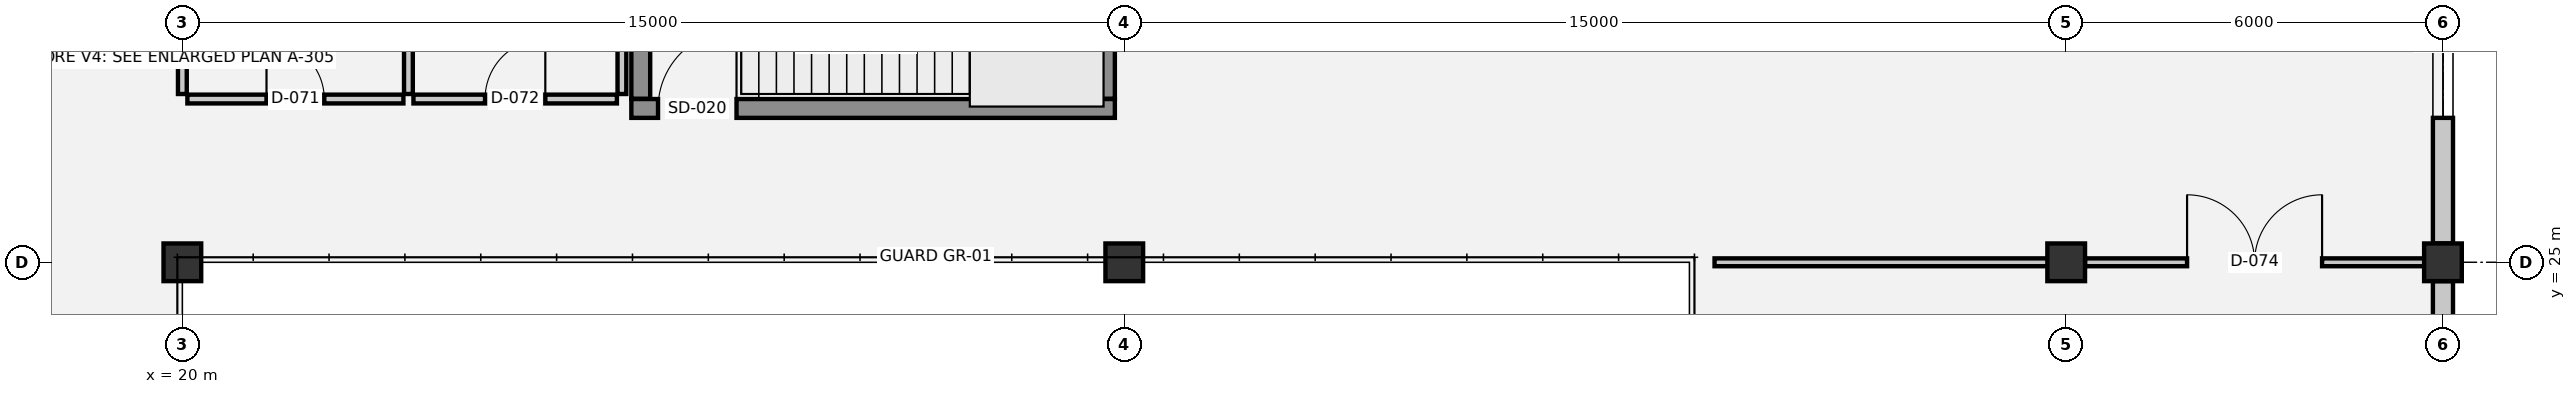
"""IFC4 building model, lengths in metres.
Left out: names, types, materials, properties, quantities, classifications, styles, units other than length and angle.
Written with IfcOpenShell. Run it as: python <this file> out.ifc"""

import sys

from ifc_helpers import new_model, si_unit, direction, frame, frame_2d, origin, origin_2d, place, context, subcontext, project, spatial, rectangle, extrude, element, fill, save


model = new_model("IFC4")
c1 = context("Model", 3, precision=1e-05, world=origin(), true_north=direction((0.0, 1.0)))
c2 = subcontext(c1, "Body", "Model", "MODEL_VIEW")
j1 = project(units=[si_unit("LENGTHUNIT", "METRE"), si_unit("PLANEANGLEUNIT", "RADIAN")], contexts=[c1])
p1 = place(None, origin())
s1 = spatial("IfcSite", under=j1, at=p1, CompositionType="ELEMENT")
p2 = place(p1, origin())
s2 = spatial("IfcBuilding", under=s1, at=p2, CompositionType="ELEMENT")
p3 = place(p2, frame((0.0, 0.0, 9.9)))
s3 = spatial("IfcBuildingStorey", under=s2, at=p3, CompositionType="ELEMENT", Elevation=9.9)
for number, where, z_axis, x_axis in (
    (1, (20.0, 25.0, 0.0), (0.0, 0.0, 1.0), (1.0, 0.0, 0.0)),
    (2, (35.0, 25.0, 0.0), (0.0, 0.0, 1.0), (1.0, 0.0, 0.0)),
    (3, (50.0, 25.0, 0.0), (0.0, 0.0, 1.0), (1.0, 0.0, 0.0)),
    (4, (56.0, 25.0, 0.0), (0.0, 0.0, 1.0), (1.0, 0.0, 0.0)),
):
    element("IfcColumn", number, at=place(p3, frame(where, z_axis=z_axis, x_axis=x_axis)), inside=s3, PredefinedType="COLUMN", context=c2, shape_type="SweptSolid", body=[
        extrude(rectangle(XDim=0.6, YDim=0.6, at=origin_2d()), origin(), (0.0, 0.0, 1.0), 4.5),
    ])
p4 = place(p3, frame((56.0, 31.7, 0.0), z_axis=(0.0, 0.0, 1.0), x_axis=(0.0, -1.0, 0.0)))
e5 = element("IfcWall", 5, at=p4, inside=s3, PredefinedType="SOLIDWALL", context=c2, shape_type="SweptSolid", body=[
    extrude(rectangle(XDim=6.4, YDim=0.32, at=frame_2d((3.2, 0.0))), origin(), (0.0, 0.0, 1.0), 3.26),
])
p5 = place(p4, frame((2.0, 0.0, 0.9)))
e6 = element("IfcOpeningElement", 6, at=p5, cuts=e5, PredefinedType="OPENING", context=c2, shape_type="SweptSolid", body=[
    extrude(rectangle(XDim=2.4, YDim=2.1, at=frame_2d((1.2, 1.05))), frame((0.0, 0.17, 0.0), z_axis=(0.0, -1.0, 0.0), x_axis=(1.0, 0.0, 0.0)), (0.0, 0.0, 1.0), 0.34),
])
p6 = place(p3, frame((56.0, 24.7, 0.0), z_axis=(0.0, 0.0, 1.0), x_axis=(0.0, -1.0, 0.0)))
e7 = element("IfcWall", 7, at=p6, inside=s3, PredefinedType="SOLIDWALL", context=c2, shape_type="SweptSolid", body=[
    extrude(rectangle(XDim=7.4, YDim=0.32, at=frame_2d((3.7, 0.0))), origin(), (0.0, 0.0, 1.0), 3.26),
])
p7 = place(p6, frame((2.5, 0.0, 0.9)))
e8 = element("IfcOpeningElement", 8, at=p7, cuts=e7, PredefinedType="OPENING", context=c2, shape_type="SweptSolid", body=[
    extrude(rectangle(XDim=2.4, YDim=2.1, at=frame_2d((1.2, 1.05))), frame((0.0, 0.17, 0.0), z_axis=(0.0, -1.0, 0.0), x_axis=(1.0, 0.0, 0.0)), (0.0, 0.0, 1.0), 0.34),
])
p8 = place(p3, frame((15.05, 28.325, 0.0), z_axis=(0.0, 0.0, 1.0), x_axis=(1.0, 0.0, 0.0)))
e9 = element("IfcWall", 9, at=p8, inside=s3, PredefinedType="SHEAR", context=c2, shape_type="SweptSolid", body=[
    extrude(rectangle(XDim=2.9, YDim=0.25, at=frame_2d((1.45, 0.0))), origin(), (0.0, 0.0, 1.0), 4.5),
])
p9 = place(p8, frame((0.9, 0.0, 0.0)))
e10 = element("IfcOpeningElement", 10, at=p9, cuts=e9, PredefinedType="OPENING", context=c2, shape_type="SweptSolid", body=[
    extrude(rectangle(XDim=1.1, YDim=2.15, at=frame_2d((0.55, 1.075))), frame((0.0, 0.135, 0.0), z_axis=(0.0, -1.0, 0.0), x_axis=(1.0, 0.0, 0.0)), (0.0, 0.0, 1.0), 0.27),
])
p10 = place(p3, frame((27.15, 27.45, 0.0), z_axis=(0.0, 0.0, 1.0), x_axis=(1.0, 0.0, 0.0)))
e11 = element("IfcWall", 11, at=p10, inside=s3, PredefinedType="SHEAR", context=c2, shape_type="SweptSolid", body=[
    extrude(rectangle(XDim=7.7, YDim=0.3, at=frame_2d((3.85, 0.0))), origin(), (0.0, 0.0, 1.0), 4.24),
])
p11 = place(p10, frame((0.425, 0.0, 0.0)))
e12 = element("IfcOpeningElement", 12, at=p11, cuts=e11, PredefinedType="OPENING", context=c2, shape_type="SweptSolid", body=[
    extrude(rectangle(XDim=1.25, YDim=2.15, at=frame_2d((0.625, 1.075))), frame((0.0, 0.16, 0.0), z_axis=(0.0, -1.0, 0.0), x_axis=(1.0, 0.0, 0.0)), (0.0, 0.0, 1.0), 0.32),
])
for number, where, z_axis, x_axis in (
    (13, (27.3, 31.805, 0.0), (0.0, 0.0, 1.0), (0.0, -1.0, 0.0)),
    (14, (34.7, 27.605, 0.0), (0.0, 0.0, 1.0), (0.0, 1.0, 0.0)),
):
    element("IfcWall", number, at=place(p3, frame(where, z_axis=z_axis, x_axis=x_axis)), inside=s3, PredefinedType="SHEAR", context=c2, shape_type="SweptSolid", body=[
        extrude(rectangle(XDim=4.2, YDim=0.3, at=frame_2d((2.1, 0.0))), origin(), (0.0, 0.0, 1.0), 4.24),
    ])
p12 = place(p3, frame((44.4, 25.0, 0.0), z_axis=(0.0, 0.0, 1.0), x_axis=(1.0, 0.0, 0.0)))
e15 = element("IfcWall", 15, at=p12, inside=s3, PredefinedType="PARTITIONING", context=c2, shape_type="SweptSolid", body=[
    extrude(rectangle(XDim=5.9, YDim=0.125, at=frame_2d((2.95, 0.0))), origin(), (0.0, 0.0, 1.0), 3.28),
])
p13 = place(p3, frame((50.3, 25.0, 0.0), z_axis=(0.0, 0.0, 1.0), x_axis=(1.0, 0.0, 0.0)))
e16 = element("IfcWall", 16, at=p13, inside=s3, PredefinedType="PARTITIONING", context=c2, shape_type="SweptSolid", body=[
    extrude(rectangle(XDim=5.62, YDim=0.125, at=frame_2d((2.81, 0.0))), origin(), (0.0, 0.0, 1.0), 3.53),
])
p14 = place(p13, frame((1.625, 0.0, 0.0)))
e17 = element("IfcOpeningElement", 17, at=p14, cuts=e16, PredefinedType="OPENING", context=c2, shape_type="SweptSolid", body=[
    extrude(rectangle(XDim=2.15, YDim=2.4, at=frame_2d((1.075, 1.2))), frame((0.0, 0.073, 0.0), z_axis=(0.0, -1.0, 0.0), x_axis=(1.0, 0.0, 0.0)), (0.0, 0.0, 1.0), 0.145),
])
p15 = place(p3, frame((20.08, 27.6, 0.0), z_axis=(0.0, 0.0, 1.0), x_axis=(1.0, 0.0, 0.0)))
e18 = element("IfcWall", 18, at=p15, inside=s3, PredefinedType="PLUMBINGWALL", context=c2, shape_type="SweptSolid", body=[
    extrude(rectangle(XDim=3.44, YDim=0.14, at=frame_2d((1.72, 0.0))), origin(), (0.0, 0.0, 1.0), 4.14),
])
p16 = place(p15, frame((1.26, 0.0, 0.0)))
e19 = element("IfcOpeningElement", 19, at=p16, cuts=e18, PredefinedType="OPENING", context=c2, shape_type="SweptSolid", body=[
    extrude(rectangle(XDim=0.92, YDim=2.1, at=frame_2d((0.46, 1.05))), frame((0.0, 0.08, 0.0), z_axis=(0.0, -1.0, 0.0), x_axis=(1.0, 0.0, 0.0)), (0.0, 0.0, 1.0), 0.16),
])
p17 = place(p3, frame((23.68, 27.6, 0.0), z_axis=(0.0, 0.0, 1.0), x_axis=(1.0, 0.0, 0.0)))
e20 = element("IfcWall", 20, at=p17, inside=s3, PredefinedType="PLUMBINGWALL", context=c2, shape_type="SweptSolid", body=[
    extrude(rectangle(XDim=3.24, YDim=0.14, at=frame_2d((1.62, 0.0))), origin(), (0.0, 0.0, 1.0), 4.14),
])
p18 = place(p17, frame((1.14, 0.0, 0.0)))
e21 = element("IfcOpeningElement", 21, at=p18, cuts=e20, PredefinedType="OPENING", context=c2, shape_type="SweptSolid", body=[
    extrude(rectangle(XDim=0.96, YDim=2.1, at=frame_2d((0.48, 1.05))), frame((0.0, 0.08, 0.0), z_axis=(0.0, -1.0, 0.0), x_axis=(1.0, 0.0, 0.0)), (0.0, 0.0, 1.0), 0.16),
])
p19 = place(p3, frame((20.0, 27.68, 0.0), z_axis=(0.0, 0.0, 1.0), x_axis=(0.0, 1.0, 0.0)))
e22 = element("IfcWall", 22, at=p19, inside=s3, PredefinedType="PLUMBINGWALL", context=c2, shape_type="SweptSolid", body=[
    extrude(rectangle(XDim=4.24, YDim=0.14, at=frame_2d((2.12, 0.0))), origin(), (0.0, 0.0, 1.0), 3.68),
])
for number, where, z_axis, x_axis in (
    (23, (23.6, 27.68, 0.0), (0.0, 0.0, 1.0), (0.0, 1.0, 0.0)),
    (24, (27.0, 27.68, 0.0), (0.0, 0.0, 1.0), (0.0, 1.0, 0.0)),
):
    element("IfcWall", number, at=place(p3, frame(where, z_axis=z_axis, x_axis=x_axis)), inside=s3, PredefinedType="PLUMBINGWALL", context=c2, shape_type="SweptSolid", body=[
        extrude(rectangle(XDim=4.24, YDim=0.14, at=frame_2d((2.12, 0.0))), origin(), (0.0, 0.0, 1.0), 4.14),
    ])
p20 = place(p5, origin())
e25 = element("IfcWindow", 25, at=p20, inside=s3, PartitioningType="SINGLE_PANEL", PredefinedType="WINDOW", context=c2, shape_type="SweptSolid", body=[
    extrude(rectangle(XDim=2.4, YDim=2.1, at=frame_2d((1.2, 1.05))), frame((0.0, 0.03, 0.0), z_axis=(0.0, -1.0, 0.0), x_axis=(1.0, 0.0, 0.0)), (0.0, 0.0, 1.0), 0.06),
])
fill(e6, e25)
p21 = place(p11, origin())
e26 = element("IfcDoor", 26, at=p21, inside=s3, OperationType="SINGLE_SWING_RIGHT", PredefinedType="DOOR", context=c2, shape_type="SweptSolid", body=[
    extrude(rectangle(XDim=1.25, YDim=2.15, at=frame_2d((0.625, 1.075))), frame((0.0, 0.025, 0.0), z_axis=(0.0, -1.0, 0.0), x_axis=(1.0, 0.0, 0.0)), (0.0, 0.0, 1.0), 0.05),
])
fill(e12, e26)
p22 = place(p16, origin())
e27 = element("IfcDoor", 27, at=p22, inside=s3, OperationType="SINGLE_SWING_LEFT", PredefinedType="DOOR", context=c2, shape_type="SweptSolid", body=[
    extrude(rectangle(XDim=0.92, YDim=2.1, at=frame_2d((0.46, 1.05))), frame((0.0, 0.025, 0.0), z_axis=(0.0, -1.0, 0.0), x_axis=(1.0, 0.0, 0.0)), (0.0, 0.0, 1.0), 0.05),
])
fill(e19, e27)
p23 = place(p18, origin())
e28 = element("IfcDoor", 28, at=p23, inside=s3, OperationType="SINGLE_SWING_RIGHT", PredefinedType="DOOR", context=c2, shape_type="SweptSolid", body=[
    extrude(rectangle(XDim=0.96, YDim=2.1, at=frame_2d((0.48, 1.05))), frame((0.0, 0.025, 0.0), z_axis=(0.0, -1.0, 0.0), x_axis=(1.0, 0.0, 0.0)), (0.0, 0.0, 1.0), 0.05),
])
fill(e21, e28)
p24 = place(p14, origin())
e29 = element("IfcDoor", 29, at=p24, inside=s3, OperationType="DOUBLE_DOOR_SINGLE_SWING", PredefinedType="DOOR", context=c2, shape_type="SweptSolid", body=[
    extrude(rectangle(XDim=2.15, YDim=2.4, at=frame_2d((1.075, 1.2))), frame((0.0, 0.025, 0.0), z_axis=(0.0, -1.0, 0.0), x_axis=(1.0, 0.0, 0.0)), (0.0, 0.0, 1.0), 0.05),
])
fill(e17, e29)
save(model, sys.argv[1])
